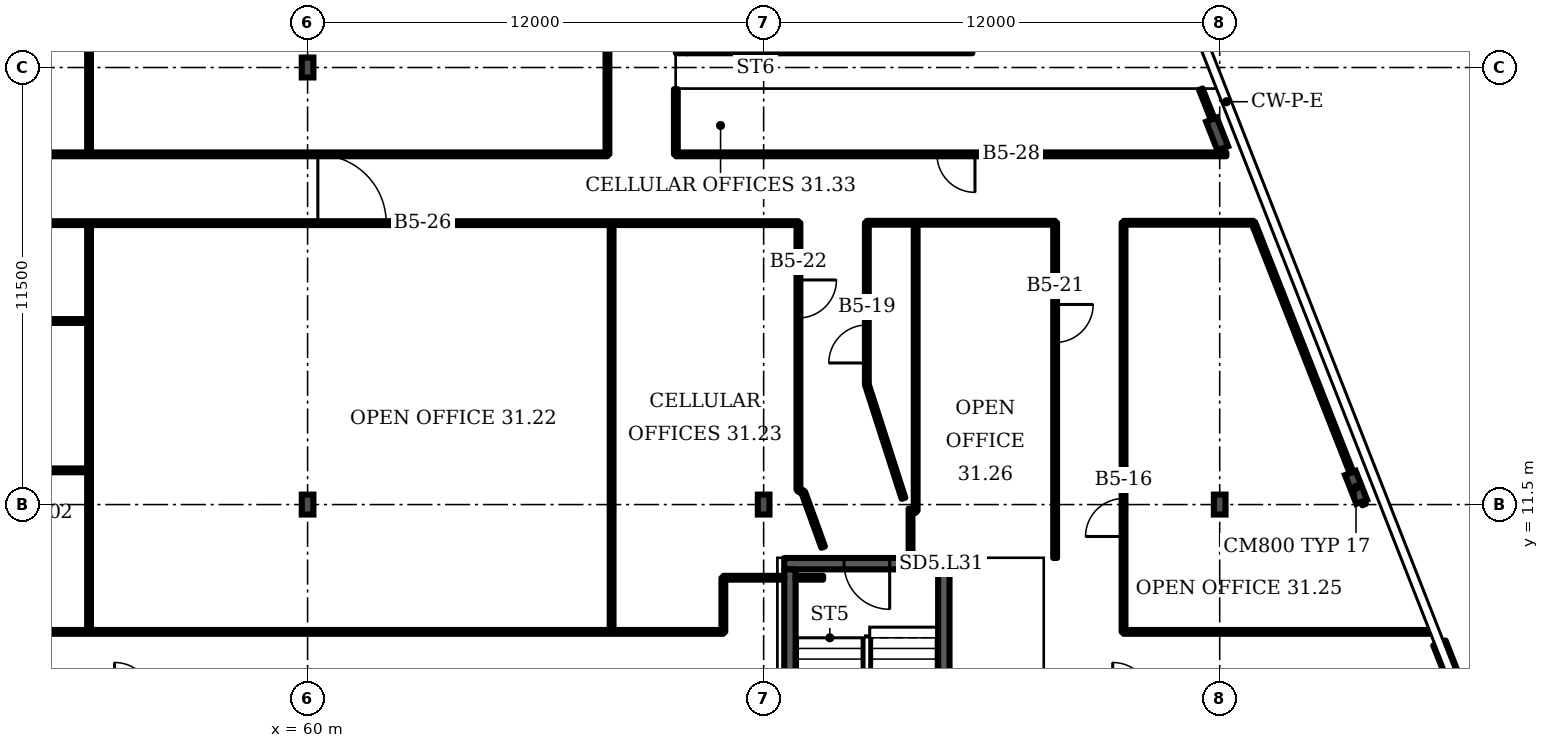
"""IFC4 building model, lengths in metres.
Left out: names, types, materials, properties, quantities, classifications, styles, units other than length and angle.
Written with IfcOpenShell. Run it as: python <this file> out.ifc"""

import sys

from ifc_helpers import new_model, si_unit, direction, frame, frame_2d, origin, origin_2d, place, context, subcontext, project, spatial, rectangle, i_section, extrude, element, fill, save


model = new_model("IFC4")
c1 = context("Model", 3, precision=1e-05, world=origin(), true_north=direction((0.0, 1.0)))
c2 = subcontext(c1, "Body", "Model", "MODEL_VIEW")
j1 = project(units=[si_unit("LENGTHUNIT", "METRE"), si_unit("PLANEANGLEUNIT", "RADIAN")], contexts=[c1])
p1 = place(None, origin())
s1 = spatial("IfcSite", under=j1, at=p1, CompositionType="ELEMENT")
p2 = place(p1, origin())
s2 = spatial("IfcBuilding", under=s1, at=p2, CompositionType="ELEMENT")
p3 = place(p2, frame((0.0, 0.0, 132.7)))
s3 = spatial("IfcBuildingStorey", under=s2, at=p3, CompositionType="ELEMENT", Elevation=132.7)
for number, where, z_axis, x_axis in (
    (1, (87.587, 11.952, 0.0), (0.0, 0.0, 1.0), (0.931, 0.366, 0.0)),
    (2, (83.933, 21.251, 0.0), (0.0, 0.0, 1.0), (0.931, 0.366, 0.0)),
):
    element("IfcColumn", number, at=place(p3, frame(where, z_axis=z_axis, x_axis=x_axis)), inside=s3, PredefinedType="COLUMN", context=c2, shape_type="SweptSolid", body=[
        extrude(i_section(OverallWidth=0.303, OverallDepth=0.814, WebThickness=0.021, FlangeThickness=0.04, FilletRadius=0.03, at=origin_2d()), origin(), (0.0, 0.0, 1.0), 3.6),
    ])
for number, where, z_axis, x_axis in (
    (3, (60.0, 11.5, 0.0), (0.0, 0.0, 1.0), (1.0, 0.0, 0.0)),
    (4, (72.0, 11.5, 0.0), (0.0, 0.0, 1.0), (1.0, 0.0, 0.0)),
    (5, (84.0, 11.5, 0.0), (0.0, 0.0, 1.0), (1.0, 0.0, 0.0)),
    (6, (60.0, 23.0, 0.0), (0.0, 0.0, 1.0), (1.0, 0.0, 0.0)),
):
    element("IfcColumn", number, at=place(p3, frame(where, z_axis=z_axis, x_axis=x_axis)), inside=s3, PredefinedType="COLUMN", context=c2, shape_type="SweptSolid", body=[
        extrude(i_section(OverallWidth=0.306, OverallDepth=0.524, WebThickness=0.021, FlangeThickness=0.04, FilletRadius=0.027, at=origin_2d()), origin(), (0.0, 0.0, 1.0), 3.6),
    ])
p4 = place(p3, frame((91.921, 2.414, 0.0), z_axis=(0.0, 0.0, 1.0), x_axis=(-0.36578, 0.930701, 0.0)))
e7 = element("IfcWall", 7, at=p4, inside=s3, PredefinedType="SOLIDWALL", context=c2, shape_type="SweptSolid", body=[
    extrude(rectangle(XDim=5.852, YDim=0.35, at=frame_2d((2.926, 0.0))), origin(), (0.0, 0.0, 1.0), 1.0),
])
p5 = place(p3, frame((72.541, 9.945, 0.0), z_axis=(0.0, 0.0, 1.0), x_axis=(1.0, 0.0, 0.0)))
e8 = element("IfcWall", 8, at=p5, inside=s3, PredefinedType="SHEAR", context=c2, shape_type="SweptSolid", body=[
    extrude(rectangle(XDim=4.35, YDim=0.3, at=frame_2d((2.175, 0.0))), origin(), (0.0, 0.0, 1.0), 3.2),
])
p6 = place(p5, frame((1.575, 0.0, 0.0)))
e9 = element("IfcOpeningElement", 9, at=p6, cuts=e8, PredefinedType="OPENING", context=c2, shape_type="SweptSolid", body=[
    extrude(rectangle(XDim=1.2, YDim=2.1, at=frame_2d((0.6, 1.05))), frame((0.0, 0.16, 0.0), z_axis=(0.0, -1.0, 0.0), x_axis=(1.0, 0.0, 0.0)), (0.0, 0.0, 1.0), 0.32),
])
p7 = place(p3, frame((69.84, 23.375, 0.0), z_axis=(0.0, 0.0, 1.0), x_axis=(0.0, 1.0, 0.0)))
e10 = element("IfcWall", 10, at=p7, inside=s3, PredefinedType="SHEAR", context=c2, shape_type="SweptSolid", body=[
    extrude(rectangle(XDim=4.35, YDim=0.3, at=frame_2d((2.175, 0.0))), origin(), (0.0, 0.0, 1.0), 3.2),
])
p8 = place(p7, frame((1.575, 0.0, 0.0)))
e11 = element("IfcOpeningElement", 11, at=p8, cuts=e10, PredefinedType="OPENING", context=c2, shape_type="SweptSolid", body=[
    extrude(rectangle(XDim=1.2, YDim=2.1, at=frame_2d((0.6, 1.05))), frame((0.0, 0.16, 0.0), z_axis=(0.0, -1.0, 0.0), x_axis=(1.0, 0.0, 0.0)), (0.0, 0.0, 1.0), 0.32),
])
p9 = place(p3, frame((18.505, 20.715, 0.0), z_axis=(0.0, 0.0, 1.0), x_axis=(1.0, 0.0, 0.0)))
e12 = element("IfcWall", 12, at=p9, inside=s3, PredefinedType="PARTITIONING", context=c2, shape_type="SweptSolid", body=[
    extrude(rectangle(XDim=49.385, YDim=0.1, at=frame_2d((24.692, 0.0))), origin(), (0.0, 0.0, 1.0), 3.2),
])
p10 = place(p9, frame((1.025, 0.0, 0.0)))
e13 = element("IfcOpeningElement", 13, at=p10, cuts=e12, PredefinedType="OPENING", context=c2, shape_type="SweptSolid", body=[
    extrude(rectangle(XDim=1.0, YDim=2.1, at=frame_2d((0.5, 1.05))), frame((0.0, 0.06, 0.0), z_axis=(0.0, -1.0, 0.0), x_axis=(1.0, 0.0, 0.0)), (0.0, 0.0, 1.0), 0.12),
])
p11 = place(p3, frame((43.795, 18.905, 0.0), z_axis=(0.0, 0.0, 1.0), x_axis=(1.0, 0.0, 0.0)))
e14 = element("IfcWall", 14, at=p11, inside=s3, PredefinedType="PARTITIONING", context=c2, shape_type="SweptSolid", body=[
    extrude(rectangle(XDim=29.12, YDim=0.1, at=frame_2d((14.56, 0.0))), origin(), (0.0, 0.0, 1.0), 3.2),
])
p12 = place(p11, frame((16.475, 0.0, 0.0)))
e15 = element("IfcOpeningElement", 15, at=p12, cuts=e14, PredefinedType="OPENING", context=c2, shape_type="SweptSolid", body=[
    extrude(rectangle(XDim=1.8, YDim=2.1, at=frame_2d((0.9, 1.05))), frame((0.0, 0.06, 0.0), z_axis=(0.0, -1.0, 0.0), x_axis=(1.0, 0.0, 0.0)), (0.0, 0.0, 1.0), 0.12),
])
for number, where, z_axis, x_axis in (
    (16, (45.585, 12.4, 0.0), (0.0, 0.0, 1.0), (1.0, 0.0, 0.0)),
    (17, (45.585, 16.33, 0.0), (0.0, 0.0, 1.0), (1.0, 0.0, 0.0)),
):
    element("IfcWall", number, at=place(p3, frame(where, z_axis=z_axis, x_axis=x_axis)), inside=s3, PredefinedType="PARTITIONING", context=c2, shape_type="SweptSolid", body=[
        extrude(rectangle(XDim=8.665, YDim=0.1, at=frame_2d((4.333, 0.0))), origin(), (0.0, 0.0, 1.0), 3.2),
    ])
p13 = place(p3, frame((49.955, 8.15, 0.0), z_axis=(0.0, 0.0, 1.0), x_axis=(1.0, 0.0, 0.0)))
e18 = element("IfcWall", 18, at=p13, inside=s3, PredefinedType="PARTITIONING", context=c2, shape_type="SweptSolid", body=[
    extrude(rectangle(XDim=20.985, YDim=0.1, at=frame_2d((10.492, 0.0))), origin(), (0.0, 0.0, 1.0), 3.2),
])
p14 = place(p3, frame((54.25, 8.15, 0.0), z_axis=(0.0, 0.0, 1.0), x_axis=(0.0, 1.0, 0.0)))
e19 = element("IfcWall", 19, at=p14, inside=s3, PredefinedType="PARTITIONING", context=c2, shape_type="SweptSolid", body=[
    extrude(rectangle(XDim=10.765, YDim=0.1, at=frame_2d((5.383, 0.0))), origin(), (0.0, 0.0, 1.0), 3.2),
])
p15 = place(p3, frame((54.25, 20.715, 0.0), z_axis=(0.0, 0.0, 1.0), x_axis=(0.0, 1.0, 0.0)))
e20 = element("IfcWall", 20, at=p15, inside=s3, PredefinedType="PARTITIONING", context=c2, shape_type="SweptSolid", body=[
    extrude(rectangle(XDim=9.785, YDim=0.1, at=frame_2d((4.893, 0.0))), origin(), (0.0, 0.0, 1.0), 3.2),
])
p16 = place(p3, frame((67.89, 20.715, 0.0), z_axis=(0.0, 0.0, 1.0), x_axis=(0.0, 1.0, 0.0)))
e21 = element("IfcWall", 21, at=p16, inside=s3, PredefinedType="PARTITIONING", context=c2, shape_type="SweptSolid", body=[
    extrude(rectangle(XDim=5.985, YDim=0.1, at=frame_2d((2.992, 0.0))), origin(), (0.0, 0.0, 1.0), 3.2),
])
p17 = place(p3, frame((68.0, 8.15, 0.0), z_axis=(0.0, 0.0, 1.0), x_axis=(0.0, 1.0, 0.0)))
e22 = element("IfcWall", 22, at=p17, inside=s3, PredefinedType="PARTITIONING", context=c2, shape_type="SweptSolid", body=[
    extrude(rectangle(XDim=10.765, YDim=0.1, at=frame_2d((5.383, 0.0))), origin(), (0.0, 0.0, 1.0), 3.2),
])
p18 = place(p3, frame((69.69, 20.715, 0.0), z_axis=(0.0, 0.0, 1.0), x_axis=(0.0, 1.0, 0.0)))
e23 = element("IfcWall", 23, at=p18, inside=s3, PredefinedType="PARTITIONING", context=c2, shape_type="SweptSolid", body=[
    extrude(rectangle(XDim=1.715, YDim=0.1, at=frame_2d((0.857, 0.0))), origin(), (0.0, 0.0, 1.0), 3.2),
])
p19 = place(p3, frame((69.69, 20.715, 0.0), z_axis=(0.0, 0.0, 1.0), x_axis=(1.0, 0.0, 0.0)))
e24 = element("IfcWall", 24, at=p19, inside=s3, PredefinedType="PARTITIONING", context=c2, shape_type="SweptSolid", body=[
    extrude(rectangle(XDim=14.485, YDim=0.1, at=frame_2d((7.243, 0.0))), origin(), (0.0, 0.0, 1.0), 3.2),
])
p20 = place(p19, frame((6.871, 0.0, 0.0)))
e25 = element("IfcOpeningElement", 25, at=p20, cuts=e24, PredefinedType="OPENING", context=c2, shape_type="SweptSolid", body=[
    extrude(rectangle(XDim=1.0, YDim=2.1, at=frame_2d((0.5, 1.05))), frame((0.0, 0.06, 0.0), z_axis=(0.0, -1.0, 0.0), x_axis=(1.0, 0.0, 0.0)), (0.0, 0.0, 1.0), 0.12),
])
p21 = place(p3, frame((70.94, 8.15, 0.0), z_axis=(0.0, 0.0, 1.0), x_axis=(0.0, 1.0, 0.0)))
e26 = element("IfcWall", 26, at=p21, inside=s3, PredefinedType="PARTITIONING", context=c2, shape_type="SweptSolid", body=[
    extrude(rectangle(XDim=1.42, YDim=0.1, at=frame_2d((0.71, 0.0))), origin(), (0.0, 0.0, 1.0), 3.2),
])
p22 = place(p3, frame((70.94, 9.575, 0.0), z_axis=(0.0, 0.0, 1.0), x_axis=(1.0, 0.0, 0.0)))
e27 = element("IfcWall", 27, at=p22, inside=s3, PredefinedType="PARTITIONING", context=c2, shape_type="SweptSolid", body=[
    extrude(rectangle(XDim=1.601, YDim=0.1, at=frame_2d((0.801, 0.0))), origin(), (0.0, 0.0, 1.0), 3.2),
])
p23 = place(p3, frame((72.915, 11.895, 0.0), z_axis=(0.0, 0.0, 1.0), x_axis=(0.0, 1.0, 0.0)))
e28 = element("IfcWall", 28, at=p23, inside=s3, PredefinedType="PARTITIONING", context=c2, shape_type="SweptSolid", body=[
    extrude(rectangle(XDim=7.02, YDim=0.1, at=frame_2d((3.51, 0.0))), origin(), (0.0, 0.0, 1.0), 3.2),
])
p24 = place(p23, frame((4.515, 0.0, 0.0)))
e29 = element("IfcOpeningElement", 29, at=p24, cuts=e28, PredefinedType="OPENING", context=c2, shape_type="SweptSolid", body=[
    extrude(rectangle(XDim=1.0, YDim=2.1, at=frame_2d((0.5, 1.05))), frame((0.0, 0.06, 0.0), z_axis=(0.0, -1.0, 0.0), x_axis=(1.0, 0.0, 0.0)), (0.0, 0.0, 1.0), 0.12),
])
p25 = place(p3, frame((73.045, 11.815, 0.0), z_axis=(0.0, 0.0, 1.0), x_axis=(-0.851221, 0.524813, 0.0)))
e30 = element("IfcWall", 30, at=p25, inside=s3, PredefinedType="PARTITIONING", context=c2, shape_type="SweptSolid", body=[
    extrude(rectangle(XDim=0.153, YDim=0.1, at=frame_2d((0.076, 0.0))), origin(), (0.0, 0.0, 1.0), 3.2),
])
p26 = place(p3, frame((73.33, 11.035, 0.0), z_axis=(0.0, 0.0, 1.0), x_axis=(-0.343347, 0.939207, 0.0)))
e31 = element("IfcWall", 31, at=p26, inside=s3, PredefinedType="PARTITIONING", context=c2, shape_type="SweptSolid", body=[
    extrude(rectangle(XDim=0.831, YDim=0.1, at=frame_2d((0.415, 0.0))), origin(), (0.0, 0.0, 1.0), 3.2),
])
p27 = place(p3, frame((73.565, 10.38, 0.0), z_axis=(0.0, 0.0, 1.0), x_axis=(-0.337515, 0.941323, 0.0)))
e32 = element("IfcWall", 32, at=p27, inside=s3, PredefinedType="PARTITIONING", context=c2, shape_type="SweptSolid", body=[
    extrude(rectangle(XDim=0.696, YDim=0.1, at=frame_2d((0.348, 0.0))), origin(), (0.0, 0.0, 1.0), 3.2),
])
p28 = place(p3, frame((74.715, 14.66, 0.0), z_axis=(0.0, 0.0, 1.0), x_axis=(0.0, 1.0, 0.0)))
e33 = element("IfcWall", 33, at=p28, inside=s3, PredefinedType="PARTITIONING", context=c2, shape_type="SweptSolid", body=[
    extrude(rectangle(XDim=4.255, YDim=0.1, at=frame_2d((2.127, 0.0))), origin(), (0.0, 0.0, 1.0), 3.2),
])
p29 = place(p28, frame((0.565, 0.0, 0.0)))
e34 = element("IfcOpeningElement", 34, at=p29, cuts=e33, PredefinedType="OPENING", context=c2, shape_type="SweptSolid", body=[
    extrude(rectangle(XDim=1.0, YDim=2.1, at=frame_2d((0.5, 1.05))), frame((0.0, 0.06, 0.0), z_axis=(0.0, -1.0, 0.0), x_axis=(1.0, 0.0, 0.0)), (0.0, 0.0, 1.0), 0.12),
])
p30 = place(p3, frame((74.715, 18.915, 0.0), z_axis=(0.0, 0.0, 1.0), x_axis=(1.0, 0.0, 0.0)))
e35 = element("IfcWall", 35, at=p30, inside=s3, PredefinedType="PARTITIONING", context=c2, shape_type="SweptSolid", body=[
    extrude(rectangle(XDim=4.955, YDim=0.1, at=frame_2d((2.478, 0.0))), origin(), (0.0, 0.0, 1.0), 3.2),
])
p31 = place(p3, frame((75.605, 11.895, 0.0), z_axis=(0.0, 0.0, 1.0), x_axis=(-0.306376, 0.951909, 0.0)))
e36 = element("IfcWall", 36, at=p31, inside=s3, PredefinedType="PARTITIONING", context=c2, shape_type="SweptSolid", body=[
    extrude(rectangle(XDim=2.905, YDim=0.1, at=frame_2d((1.452, 0.0))), origin(), (0.0, 0.0, 1.0), 3.2),
])
p32 = place(p3, frame((75.68, 11.665, 0.0), z_axis=(0.0, 0.0, 1.0), x_axis=(-0.308902, 0.951093, 0.0)))
e37 = element("IfcWall", 37, at=p32, inside=s3, PredefinedType="PARTITIONING", context=c2, shape_type="SweptSolid", body=[
    extrude(rectangle(XDim=0.21, YDim=0.1, at=frame_2d((0.105, 0.0))), origin(), (0.0, 0.0, 1.0), 3.2),
])
p33 = place(p3, frame((75.865, 10.115, 0.0), z_axis=(0.0, 0.0, 1.0), x_axis=(0.0, 1.0, 0.0)))
e38 = element("IfcWall", 38, at=p33, inside=s3, PredefinedType="PARTITIONING", context=c2, shape_type="SweptSolid", body=[
    extrude(rectangle(XDim=1.28, YDim=0.1, at=frame_2d((0.64, 0.0))), origin(), (0.0, 0.0, 1.0), 3.2),
])
p34 = place(p3, frame((75.865, 11.315, 0.0), z_axis=(0.0, 0.0, 1.0), x_axis=(0.989182, 0.146678, 0.0)))
e39 = element("IfcWall", 39, at=p34, inside=s3, PredefinedType="PARTITIONING", context=c2, shape_type="SweptSolid", body=[
    extrude(rectangle(XDim=0.136, YDim=0.1, at=frame_2d((0.068, 0.0))), origin(), (0.0, 0.0, 1.0), 3.2),
])
p35 = place(p3, frame((76.0, 11.335, 0.0), z_axis=(0.0, 0.0, 1.0), x_axis=(0.0, 1.0, 0.0)))
e40 = element("IfcWall", 40, at=p35, inside=s3, PredefinedType="PARTITIONING", context=c2, shape_type="SweptSolid", body=[
    extrude(rectangle(XDim=7.58, YDim=0.1, at=frame_2d((3.79, 0.0))), origin(), (0.0, 0.0, 1.0), 3.2),
])
p36 = place(p3, frame((79.67, 10.095, 0.0), z_axis=(0.0, 0.0, 1.0), x_axis=(0.0, 1.0, 0.0)))
e41 = element("IfcWall", 41, at=p36, inside=s3, PredefinedType="PARTITIONING", context=c2, shape_type="SweptSolid", body=[
    extrude(rectangle(XDim=8.82, YDim=0.1, at=frame_2d((4.41, 0.0))), origin(), (0.0, 0.0, 1.0), 3.2),
])
p37 = place(p36, frame((5.67, 0.0, 0.0)))
e42 = element("IfcOpeningElement", 42, at=p37, cuts=e41, PredefinedType="OPENING", context=c2, shape_type="SweptSolid", body=[
    extrude(rectangle(XDim=1.0, YDim=2.1, at=frame_2d((0.5, 1.05))), frame((0.0, 0.06, 0.0), z_axis=(0.0, -1.0, 0.0), x_axis=(1.0, 0.0, 0.0)), (0.0, 0.0, 1.0), 0.12),
])
p38 = place(p3, frame((81.47, 8.15, 0.0), z_axis=(0.0, 0.0, 1.0), x_axis=(0.0, 1.0, 0.0)))
e43 = element("IfcWall", 43, at=p38, inside=s3, PredefinedType="PARTITIONING", context=c2, shape_type="SweptSolid", body=[
    extrude(rectangle(XDim=10.765, YDim=0.1, at=frame_2d((5.383, 0.0))), origin(), (0.0, 0.0, 1.0), 3.2),
])
p39 = place(p38, frame((2.51, 0.0, 0.0)))
e44 = element("IfcOpeningElement", 44, at=p39, cuts=e43, PredefinedType="OPENING", context=c2, shape_type="SweptSolid", body=[
    extrude(rectangle(XDim=1.0, YDim=2.1, at=frame_2d((0.5, 1.05))), frame((0.0, 0.06, 0.0), z_axis=(0.0, -1.0, 0.0), x_axis=(1.0, 0.0, 0.0)), (0.0, 0.0, 1.0), 0.12),
])
p40 = place(p3, frame((81.47, 8.15, 0.0), z_axis=(0.0, 0.0, 1.0), x_axis=(1.0, 0.0, 0.0)))
e45 = element("IfcWall", 45, at=p40, inside=s3, PredefinedType="PARTITIONING", context=c2, shape_type="SweptSolid", body=[
    extrude(rectangle(XDim=8.17, YDim=0.1, at=frame_2d((4.085, 0.0))), origin(), (0.0, 0.0, 1.0), 2.58),
])
p41 = place(p3, frame((81.47, 18.915, 0.0), z_axis=(0.0, 0.0, 1.0), x_axis=(1.0, 0.0, 0.0)))
e46 = element("IfcWall", 46, at=p41, inside=s3, PredefinedType="PARTITIONING", context=c2, shape_type="SweptSolid", body=[
    extrude(rectangle(XDim=3.415, YDim=0.1, at=frame_2d((1.708, 0.0))), origin(), (0.0, 0.0, 1.0), 3.2),
])
p42 = place(p3, frame((83.78, 21.73, 0.0), z_axis=(0.0, 0.0, 1.0), x_axis=(-0.368088, 0.929787, 0.0)))
e47 = element("IfcWall", 47, at=p42, inside=s3, PredefinedType="PARTITIONING", context=c2, shape_type="SweptSolid", body=[
    extrude(rectangle(XDim=0.753, YDim=0.1, at=frame_2d((0.376, 0.0))), origin(), (0.0, 0.0, 1.0), 2.58),
])
p43 = place(p3, frame((87.8, 11.5, 0.0), z_axis=(0.0, 0.0, 1.0), x_axis=(-0.365869, 0.930668, 0.0)))
e48 = element("IfcWall", 48, at=p43, inside=s3, PredefinedType="PARTITIONING", context=c2, shape_type="SweptSolid", body=[
    extrude(rectangle(XDim=7.968, YDim=0.1, at=frame_2d((3.984, 0.0))), origin(), (0.0, 0.0, 1.0), 2.58),
])
p44 = place(p3, frame((72.841, 9.575, 0.0), z_axis=(0.0, 0.0, 1.0), x_axis=(1.0, 0.0, 0.0)))
e49 = element("IfcWall", 49, at=p44, inside=s3, PredefinedType="PARTITIONING", context=c2, shape_type="SweptSolid", body=[
    extrude(rectangle(XDim=0.724, YDim=0.1, at=frame_2d((0.362, 0.0))), origin(), (0.0, 0.0, 1.0), 3.2),
])
for number, where, z_axis, x_axis in (
    (50, (72.691, 2.295, 0.0), (0.0, 0.0, 1.0), (0.0, 1.0, 0.0)),
    (51, (76.741, 2.295, 0.0), (0.0, 0.0, 1.0), (0.0, 1.0, 0.0)),
    (52, (69.99, 23.525, 0.0), (0.0, 0.0, 1.0), (1.0, 0.0, 0.0)),
):
    element("IfcWall", number, at=place(p3, frame(where, z_axis=z_axis, x_axis=x_axis)), inside=s3, PredefinedType="SHEAR", context=c2, shape_type="SweptSolid", body=[
        extrude(rectangle(XDim=7.5, YDim=0.3, at=frame_2d((3.75, 0.0))), origin(), (0.0, 0.0, 1.0), 3.2),
    ])
p45 = place(p6, origin())
e53 = element("IfcDoor", 53, at=p45, inside=s3, OperationType="SINGLE_SWING_RIGHT", PredefinedType="DOOR", context=c2, shape_type="SweptSolid", body=[
    extrude(rectangle(XDim=1.2, YDim=2.1, at=frame_2d((0.6, 1.05))), frame((0.0, 0.025, 0.0), z_axis=(0.0, -1.0, 0.0), x_axis=(1.0, 0.0, 0.0)), (0.0, 0.0, 1.0), 0.05),
])
fill(e9, e53)
p46 = place(p39, origin())
e54 = element("IfcDoor", 54, at=p46, inside=s3, OperationType="SINGLE_SWING_LEFT", PredefinedType="DOOR", context=c2, shape_type="SweptSolid", body=[
    extrude(rectangle(XDim=1.0, YDim=2.1, at=frame_2d((0.5, 1.05))), frame((0.0, 0.025, 0.0), z_axis=(0.0, -1.0, 0.0), x_axis=(1.0, 0.0, 0.0)), (0.0, 0.0, 1.0), 0.05),
])
fill(e44, e54)
p47 = place(p29, origin())
e55 = element("IfcDoor", 55, at=p47, inside=s3, OperationType="SINGLE_SWING_LEFT", PredefinedType="DOOR", context=c2, shape_type="SweptSolid", body=[
    extrude(rectangle(XDim=1.0, YDim=2.1, at=frame_2d((0.5, 1.05))), frame((0.0, 0.025, 0.0), z_axis=(0.0, -1.0, 0.0), x_axis=(1.0, 0.0, 0.0)), (0.0, 0.0, 1.0), 0.05),
])
fill(e34, e55)
p48 = place(p37, origin())
e56 = element("IfcDoor", 56, at=p48, inside=s3, OperationType="SINGLE_SWING_RIGHT", PredefinedType="DOOR", context=c2, shape_type="SweptSolid", body=[
    extrude(rectangle(XDim=1.0, YDim=2.1, at=frame_2d((0.5, 1.05))), frame((0.0, 0.025, 0.0), z_axis=(0.0, -1.0, 0.0), x_axis=(1.0, 0.0, 0.0)), (0.0, 0.0, 1.0), 0.05),
])
fill(e42, e56)
p49 = place(p24, origin())
e57 = element("IfcDoor", 57, at=p49, inside=s3, OperationType="SINGLE_SWING_RIGHT", PredefinedType="DOOR", context=c2, shape_type="SweptSolid", body=[
    extrude(rectangle(XDim=1.0, YDim=2.1, at=frame_2d((0.5, 1.05))), frame((0.0, 0.025, 0.0), z_axis=(0.0, -1.0, 0.0), x_axis=(1.0, 0.0, 0.0)), (0.0, 0.0, 1.0), 0.05),
])
fill(e29, e57)
p50 = place(p12, origin())
e58 = element("IfcDoor", 58, at=p50, inside=s3, OperationType="DOUBLE_DOOR_SINGLE_SWING", PredefinedType="DOOR", context=c2, shape_type="SweptSolid", body=[
    extrude(rectangle(XDim=1.8, YDim=2.1, at=frame_2d((0.9, 1.05))), frame((0.0, 0.025, 0.0), z_axis=(0.0, -1.0, 0.0), x_axis=(1.0, 0.0, 0.0)), (0.0, 0.0, 1.0), 0.05),
])
fill(e15, e58)
p51 = place(p20, origin())
e59 = element("IfcDoor", 59, at=p51, inside=s3, OperationType="SINGLE_SWING_RIGHT", PredefinedType="DOOR", context=c2, shape_type="SweptSolid", body=[
    extrude(rectangle(XDim=1.0, YDim=2.1, at=frame_2d((0.5, 1.05))), frame((0.0, 0.025, 0.0), z_axis=(0.0, -1.0, 0.0), x_axis=(1.0, 0.0, 0.0)), (0.0, 0.0, 1.0), 0.05),
])
fill(e25, e59)
save(model, sys.argv[1])
